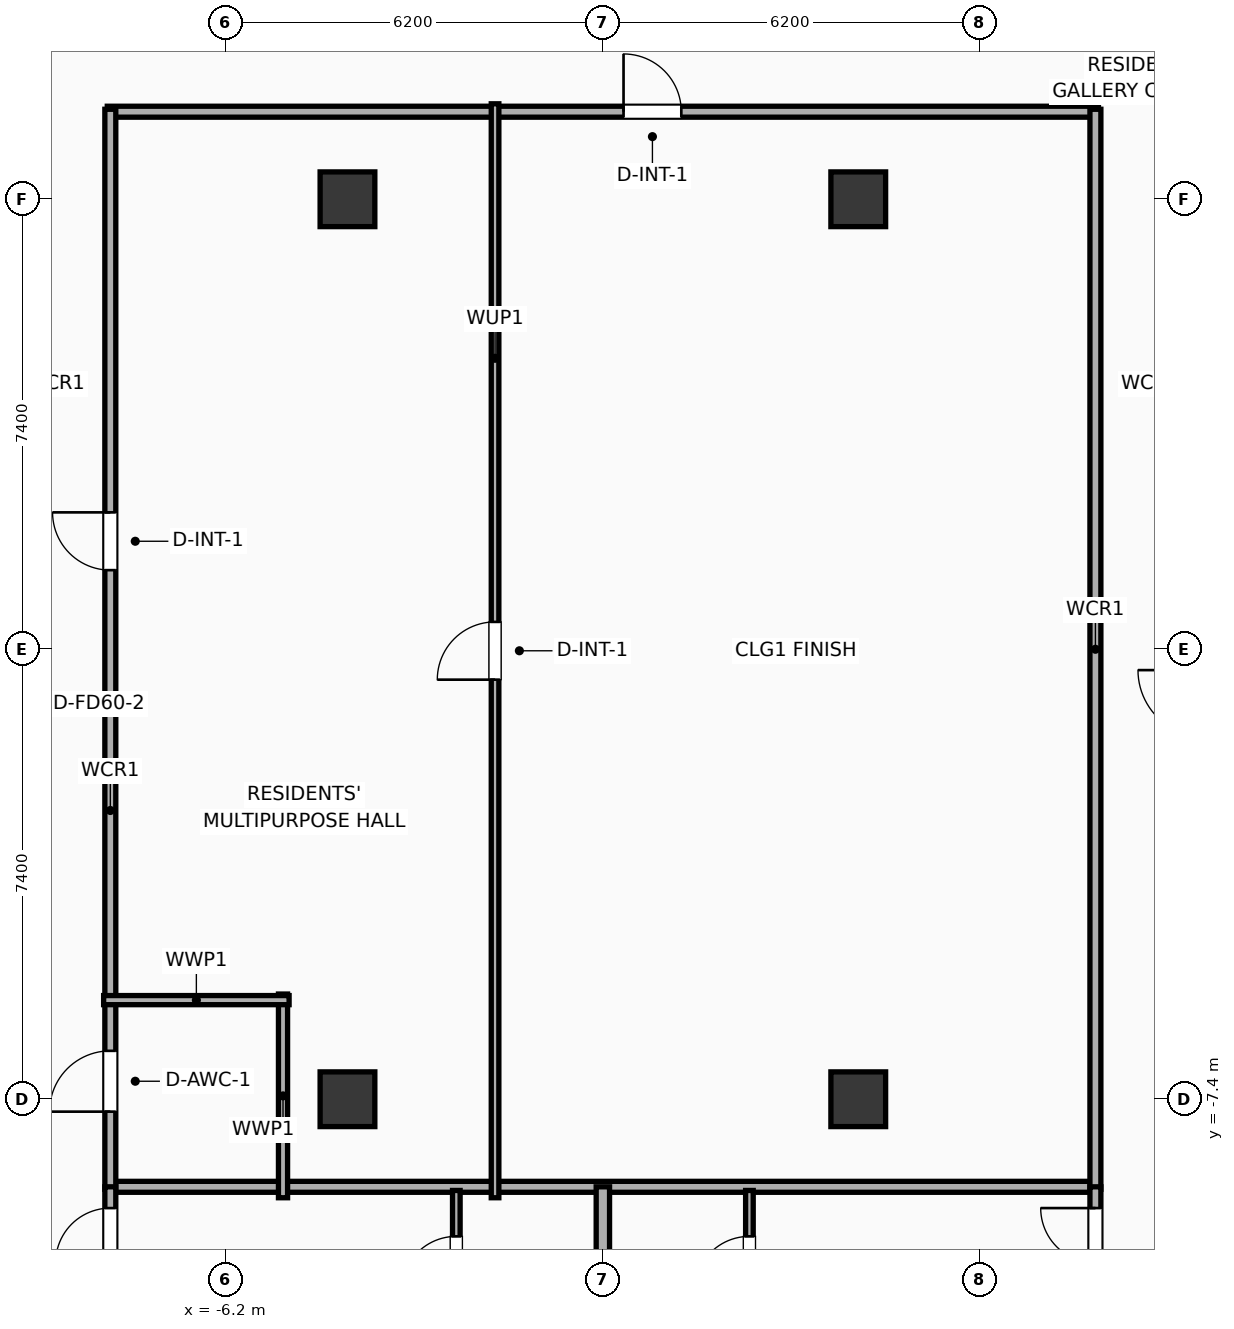
"""IFC4 building model, lengths in metres.
Left out: names, types, materials, properties, quantities, classifications, styles, units other than length and angle.
Written with IfcOpenShell. Run it as: python <this file> out.ifc"""

import sys

from ifc_helpers import new_model, si_unit, direction, frame, frame_2d, origin, origin_2d, place, context, subcontext, project, spatial, rectangle, extrude, element, fill, save


model = new_model("IFC4")
c1 = context("Model", 3, precision=1e-05, world=origin(), true_north=direction((0.0, 1.0)))
c2 = subcontext(c1, "Body", "Model", "MODEL_VIEW")
j1 = project(units=[si_unit("LENGTHUNIT", "METRE"), si_unit("PLANEANGLEUNIT", "RADIAN")], contexts=[c1])
p1 = place(None, origin())
s1 = spatial("IfcSite", under=j1, at=p1, CompositionType="ELEMENT")
p2 = place(p1, origin())
s2 = spatial("IfcBuilding", under=s1, at=p2, CompositionType="ELEMENT")
p3 = place(p2, frame((0.0, 0.0, 291.2)))
s3 = spatial("IfcBuildingStorey", under=s2, at=p3, CompositionType="ELEMENT", Elevation=291.2)
for number, where, z_axis, x_axis in (
    (1, (-4.2, -7.4, 0.0), (0.0, 0.0, 1.0), (1.0, 0.0, 0.0)),
    (2, (-4.2, 7.4, 0.0), (0.0, 0.0, 1.0), (1.0, 0.0, 0.0)),
    (3, (4.2, -7.4, 0.0), (0.0, 0.0, 1.0), (1.0, 0.0, 0.0)),
    (4, (4.2, 7.4, 0.0), (0.0, 0.0, 1.0), (1.0, 0.0, 0.0)),
):
    element("IfcColumn", number, at=place(p3, frame(where, z_axis=z_axis, x_axis=x_axis)), inside=s3, PredefinedType="COLUMN", context=c2, shape_type="SweptSolid", body=[
        extrude(rectangle(XDim=0.9, YDim=0.9, at=origin_2d()), origin(), (0.0, 0.0, 1.0), 3.9),
    ])
p4 = place(p3, frame((-8.15, 8.84, 0.0), z_axis=(0.0, 0.0, 1.0), x_axis=(1.0, 0.0, 0.0)))
e5 = element("IfcWall", 5, at=p4, inside=s3, PredefinedType="PARTITIONING", context=c2, shape_type="SweptSolid", body=[
    extrude(rectangle(XDim=16.3, YDim=0.18, at=frame_2d((8.15, 0.0))), origin(), (0.0, 0.0, 1.0), 3.635),
])
p5 = place(p4, frame((8.49, 0.0, 0.0)))
e6 = element("IfcOpeningElement", 6, at=p5, cuts=e5, PredefinedType="OPENING", context=c2, shape_type="SweptSolid", body=[
    extrude(rectangle(XDim=0.95, YDim=2.05, at=frame_2d((0.475, 1.025))), frame((0.0, 0.1, 0.0), z_axis=(0.0, -1.0, 0.0), x_axis=(1.0, 0.0, 0.0)), (0.0, 0.0, 1.0), 0.2),
])
p6 = place(p3, frame((-8.15, -8.84, 0.0), z_axis=(0.0, 0.0, 1.0), x_axis=(1.0, 0.0, 0.0)))
e7 = element("IfcWall", 7, at=p6, inside=s3, PredefinedType="PARTITIONING", context=c2, shape_type="SweptSolid", body=[
    extrude(rectangle(XDim=16.3, YDim=0.18, at=frame_2d((8.15, 0.0))), origin(), (0.0, 0.0, 1.0), 3.635),
])
p7 = place(p3, frame((-8.1, -8.88, 0.0), z_axis=(0.0, 0.0, 1.0), x_axis=(0.0, 1.0, 0.0)))
e8 = element("IfcWall", 8, at=p7, inside=s3, PredefinedType="PARTITIONING", context=c2, shape_type="SweptSolid", body=[
    extrude(rectangle(XDim=17.76, YDim=0.18, at=frame_2d((8.88, 0.0))), origin(), (0.0, 0.0, 1.0), 3.635),
])
p8 = place(p7, frame((1.276, 0.0, 0.0)))
e9 = element("IfcOpeningElement", 9, at=p8, cuts=e8, PredefinedType="OPENING", context=c2, shape_type="SweptSolid", body=[
    extrude(rectangle(XDim=1.0, YDim=2.05, at=frame_2d((0.5, 1.025))), frame((0.0, 0.1, 0.0), z_axis=(0.0, -1.0, 0.0), x_axis=(1.0, 0.0, 0.0)), (0.0, 0.0, 1.0), 0.2),
])
p9 = place(p7, frame((10.181, 0.0, 0.0)))
e10 = element("IfcOpeningElement", 10, at=p9, cuts=e8, PredefinedType="OPENING", context=c2, shape_type="SweptSolid", body=[
    extrude(rectangle(XDim=0.95, YDim=2.05, at=frame_2d((0.475, 1.025))), frame((0.0, 0.1, 0.0), z_axis=(0.0, -1.0, 0.0), x_axis=(1.0, 0.0, 0.0)), (0.0, 0.0, 1.0), 0.2),
])
p10 = place(p3, frame((8.1, -8.88, 0.0), z_axis=(0.0, 0.0, 1.0), x_axis=(0.0, 1.0, 0.0)))
e11 = element("IfcWall", 11, at=p10, inside=s3, PredefinedType="PARTITIONING", context=c2, shape_type="SweptSolid", body=[
    extrude(rectangle(XDim=17.76, YDim=0.18, at=frame_2d((8.88, 0.0))), origin(), (0.0, 0.0, 1.0), 3.635),
])
p11 = place(p3, frame((-5.26, -9.02, 0.0), z_axis=(0.0, 0.0, 1.0), x_axis=(0.0, 1.0, 0.0)))
e12 = element("IfcWall", 12, at=p11, inside=s3, PredefinedType="PLUMBINGWALL", context=c2, shape_type="SweptSolid", body=[
    extrude(rectangle(XDim=3.35, YDim=0.15, at=frame_2d((1.675, 0.0))), origin(), (0.0, 0.0, 1.0), 3.635),
])
p12 = place(p3, frame((-8.21, -5.77, 0.0), z_axis=(0.0, 0.0, 1.0), x_axis=(1.0, 0.0, 0.0)))
e13 = element("IfcWall", 13, at=p12, inside=s3, PredefinedType="PLUMBINGWALL", context=c2, shape_type="SweptSolid", body=[
    extrude(rectangle(XDim=3.05, YDim=0.15, at=frame_2d((1.525, 0.0))), origin(), (0.0, 0.0, 1.0), 3.635),
])
p13 = place(p3, frame((-1.773, -9.02, 0.0), z_axis=(0.0, 0.0, 1.0), x_axis=(0.0, 1.0, 0.0)))
e14 = element("IfcWall", 14, at=p13, inside=s3, PredefinedType="PARTITIONING", context=c2, shape_type="SweptSolid", body=[
    extrude(rectangle(XDim=17.99, YDim=0.125, at=frame_2d((8.995, 0.0))), origin(), (0.0, 0.0, 1.0), 3.635),
])
p14 = place(p13, frame((8.52, 0.0, 0.0)))
e15 = element("IfcOpeningElement", 15, at=p14, cuts=e14, PredefinedType="OPENING", context=c2, shape_type="SweptSolid", body=[
    extrude(rectangle(XDim=0.95, YDim=2.05, at=frame_2d((0.475, 1.025))), frame((0.0, 0.073, 0.0), z_axis=(0.0, -1.0, 0.0), x_axis=(1.0, 0.0, 0.0)), (0.0, 0.0, 1.0), 0.145),
])
p15 = place(p3, frame((-2.41, -11.31, 0.0), z_axis=(0.0, 0.0, 1.0), x_axis=(0.0, 1.0, 0.0)))
e16 = element("IfcWall", 16, at=p15, inside=s3, PredefinedType="PARTITIONING", context=c2, shape_type="SweptSolid", body=[
    extrude(rectangle(XDim=2.41, YDim=0.125, at=frame_2d((1.205, 0.0))), origin(), (0.0, 0.0, 1.0), 3.635),
])
p16 = place(p15, frame((0.755, 0.0, 0.0)))
e17 = element("IfcOpeningElement", 17, at=p16, cuts=e16, PredefinedType="OPENING", context=c2, shape_type="SweptSolid", body=[
    extrude(rectangle(XDim=0.9, YDim=2.05, at=frame_2d((0.45, 1.025))), frame((0.0, 0.073, 0.0), z_axis=(0.0, -1.0, 0.0), x_axis=(1.0, 0.0, 0.0)), (0.0, 0.0, 1.0), 0.145),
])
p17 = place(p3, frame((-8.1, -18.155, 0.0), z_axis=(0.0, 0.0, 1.0), x_axis=(0.0, 1.0, 0.0)))
e18 = element("IfcWall", 18, at=p17, inside=s3, PredefinedType="PARTITIONING", context=c2, shape_type="SweptSolid", body=[
    extrude(rectangle(XDim=9.314, YDim=0.18, at=frame_2d((4.657, 0.0))), origin(), (0.0, 0.0, 1.0), 3.635),
])
p18 = place(p17, frame((8.064, 0.0, 0.0)))
e19 = element("IfcOpeningElement", 19, at=p18, cuts=e18, PredefinedType="OPENING", context=c2, shape_type="SweptSolid", body=[
    extrude(rectangle(XDim=0.9, YDim=2.05, at=frame_2d((0.45, 1.025))), frame((0.0, 0.1, 0.0), z_axis=(0.0, -1.0, 0.0), x_axis=(1.0, 0.0, 0.0)), (0.0, 0.0, 1.0), 0.2),
])
p19 = place(p3, frame((2.41, -11.31, 0.0), z_axis=(0.0, 0.0, 1.0), x_axis=(0.0, 1.0, 0.0)))
e20 = element("IfcWall", 20, at=p19, inside=s3, PredefinedType="PARTITIONING", context=c2, shape_type="SweptSolid", body=[
    extrude(rectangle(XDim=2.41, YDim=0.125, at=frame_2d((1.205, 0.0))), origin(), (0.0, 0.0, 1.0), 3.635),
])
p20 = place(p19, frame((0.755, 0.0, 0.0)))
e21 = element("IfcOpeningElement", 21, at=p20, cuts=e20, PredefinedType="OPENING", context=c2, shape_type="SweptSolid", body=[
    extrude(rectangle(XDim=0.9, YDim=2.05, at=frame_2d((0.45, 1.025))), frame((0.0, 0.073, 0.0), z_axis=(0.0, -1.0, 0.0), x_axis=(1.0, 0.0, 0.0)), (0.0, 0.0, 1.0), 0.145),
])
p21 = place(p3, frame((8.1, -19.857, 0.0), z_axis=(0.0, 0.0, 1.0), x_axis=(0.0, 1.0, 0.0)))
e22 = element("IfcWall", 22, at=p21, inside=s3, PredefinedType="PARTITIONING", context=c2, shape_type="SweptSolid", body=[
    extrude(rectangle(XDim=11.017, YDim=0.18, at=frame_2d((5.509, 0.0))), origin(), (0.0, 0.0, 1.0), 3.635),
])
p22 = place(p21, frame((9.767, 0.0, 0.0)))
e23 = element("IfcOpeningElement", 23, at=p22, cuts=e22, PredefinedType="OPENING", context=c2, shape_type="SweptSolid", body=[
    extrude(rectangle(XDim=0.9, YDim=2.05, at=frame_2d((0.45, 1.025))), frame((0.0, 0.1, 0.0), z_axis=(0.0, -1.0, 0.0), x_axis=(1.0, 0.0, 0.0)), (0.0, 0.0, 1.0), 0.2),
])
p23 = place(p3, frame((0.0, -19.006, 0.0), z_axis=(0.0, 0.0, 1.0), x_axis=(0.0, 1.0, 0.0)))
e24 = element("IfcWall", 24, at=p23, inside=s3, PredefinedType="PARTITIONING", context=c2, shape_type="SweptSolid", body=[
    extrude(rectangle(XDim=10.166, YDim=0.22, at=frame_2d((5.083, 0.0))), origin(), (0.0, 0.0, 1.0), 3.635),
])
p24 = place(p5, origin())
e25 = element("IfcDoor", 25, at=p24, inside=s3, OperationType="SINGLE_SWING_LEFT", PredefinedType="DOOR", context=c2, shape_type="SweptSolid", body=[
    extrude(rectangle(XDim=0.95, YDim=2.05, at=frame_2d((0.475, 1.025))), frame((0.0, 0.025, 0.0), z_axis=(0.0, -1.0, 0.0), x_axis=(1.0, 0.0, 0.0)), (0.0, 0.0, 1.0), 0.05),
])
fill(e6, e25)
p25 = place(p8, origin())
e26 = element("IfcDoor", 26, at=p25, inside=s3, OperationType="SINGLE_SWING_LEFT", PredefinedType="DOOR", context=c2, shape_type="SweptSolid", body=[
    extrude(rectangle(XDim=1.0, YDim=2.05, at=frame_2d((0.5, 1.025))), frame((0.0, 0.025, 0.0), z_axis=(0.0, -1.0, 0.0), x_axis=(1.0, 0.0, 0.0)), (0.0, 0.0, 1.0), 0.05),
])
fill(e9, e26)
p26 = place(p9, origin())
e27 = element("IfcDoor", 27, at=p26, inside=s3, OperationType="SINGLE_SWING_RIGHT", PredefinedType="DOOR", context=c2, shape_type="SweptSolid", body=[
    extrude(rectangle(XDim=0.95, YDim=2.05, at=frame_2d((0.475, 1.025))), frame((0.0, 0.025, 0.0), z_axis=(0.0, -1.0, 0.0), x_axis=(1.0, 0.0, 0.0)), (0.0, 0.0, 1.0), 0.05),
])
fill(e10, e27)
p27 = place(p14, origin())
e28 = element("IfcDoor", 28, at=p27, inside=s3, OperationType="SINGLE_SWING_LEFT", PredefinedType="DOOR", context=c2, shape_type="SweptSolid", body=[
    extrude(rectangle(XDim=0.95, YDim=2.05, at=frame_2d((0.475, 1.025))), frame((0.0, 0.025, 0.0), z_axis=(0.0, -1.0, 0.0), x_axis=(1.0, 0.0, 0.0)), (0.0, 0.0, 1.0), 0.05),
])
fill(e15, e28)
p28 = place(p16, origin())
e29 = element("IfcDoor", 29, at=p28, inside=s3, OperationType="SINGLE_SWING_LEFT", PredefinedType="DOOR", context=c2, shape_type="SweptSolid", body=[
    extrude(rectangle(XDim=0.9, YDim=2.05, at=frame_2d((0.45, 1.025))), frame((0.0, 0.025, 0.0), z_axis=(0.0, -1.0, 0.0), x_axis=(1.0, 0.0, 0.0)), (0.0, 0.0, 1.0), 0.05),
])
fill(e17, e29)
p29 = place(p18, origin())
e30 = element("IfcDoor", 30, at=p29, inside=s3, OperationType="SINGLE_SWING_LEFT", PredefinedType="DOOR", context=c2, shape_type="SweptSolid", body=[
    extrude(rectangle(XDim=0.9, YDim=2.05, at=frame_2d((0.45, 1.025))), frame((0.0, 0.025, 0.0), z_axis=(0.0, -1.0, 0.0), x_axis=(1.0, 0.0, 0.0)), (0.0, 0.0, 1.0), 0.05),
])
fill(e19, e30)
p30 = place(p20, origin())
e31 = element("IfcDoor", 31, at=p30, inside=s3, OperationType="SINGLE_SWING_LEFT", PredefinedType="DOOR", context=c2, shape_type="SweptSolid", body=[
    extrude(rectangle(XDim=0.9, YDim=2.05, at=frame_2d((0.45, 1.025))), frame((0.0, 0.025, 0.0), z_axis=(0.0, -1.0, 0.0), x_axis=(1.0, 0.0, 0.0)), (0.0, 0.0, 1.0), 0.05),
])
fill(e21, e31)
p31 = place(p22, origin())
e32 = element("IfcDoor", 32, at=p31, inside=s3, OperationType="SINGLE_SWING_RIGHT", PredefinedType="DOOR", context=c2, shape_type="SweptSolid", body=[
    extrude(rectangle(XDim=0.9, YDim=2.05, at=frame_2d((0.45, 1.025))), frame((0.0, 0.025, 0.0), z_axis=(0.0, -1.0, 0.0), x_axis=(1.0, 0.0, 0.0)), (0.0, 0.0, 1.0), 0.05),
])
fill(e23, e32)
save(model, sys.argv[1])
